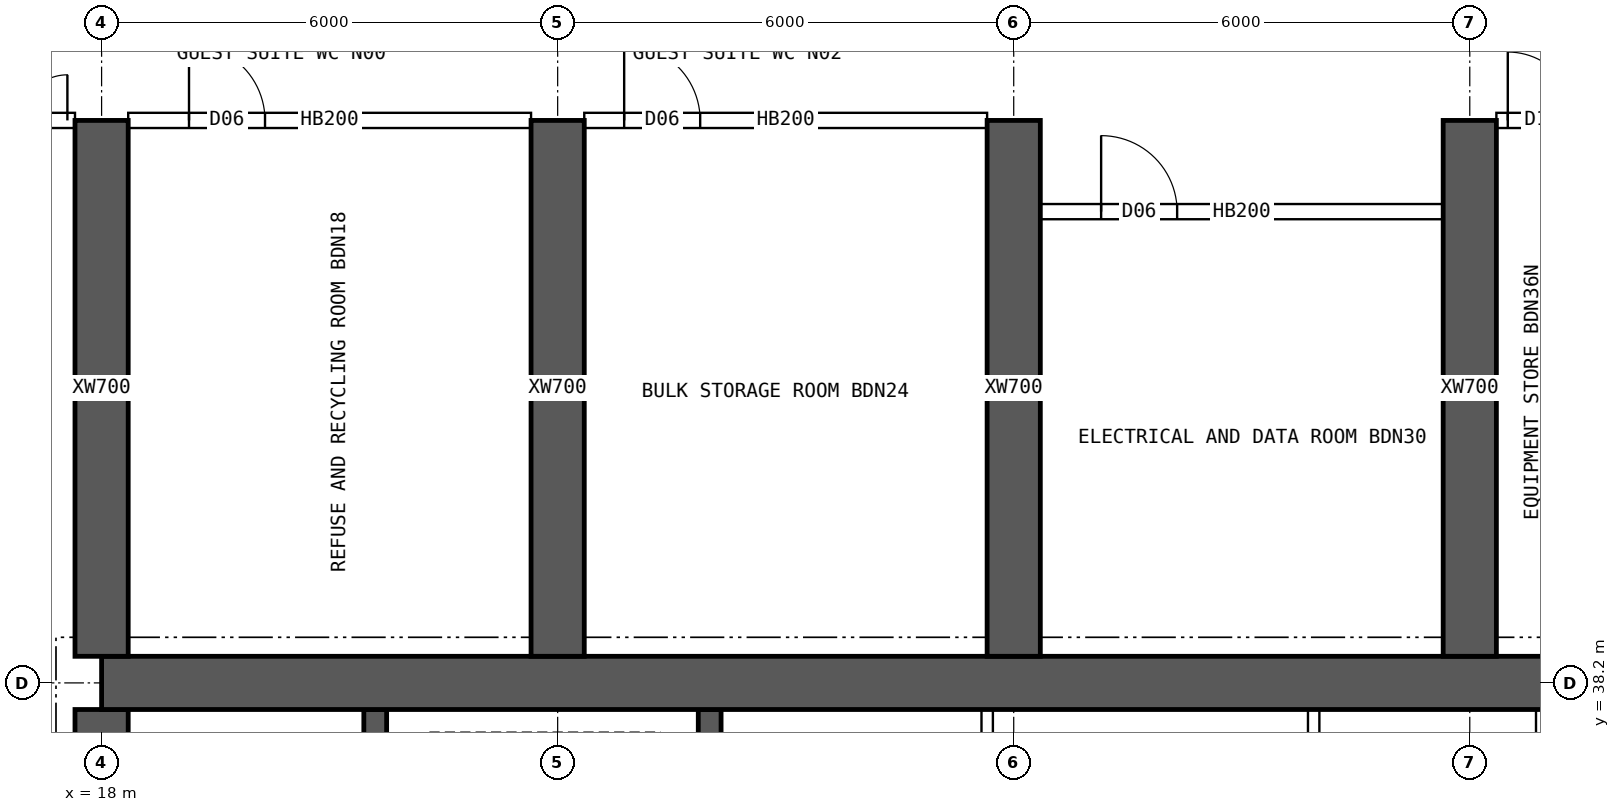
"""IFC4 building model, lengths in metres.
Left out: names, types, materials, properties, quantities, classifications, styles, units other than length and angle.
Written with IfcOpenShell. Run it as: python <this file> out.ifc"""

import sys

from ifc_helpers import new_model, si_unit, direction, frame, frame_2d, origin, place, context, subcontext, project, spatial, rectangle, extrude, element, fill, save


model = new_model("IFC4")
c1 = context("Model", 3, precision=1e-05, world=origin(), true_north=direction((0.0, 1.0)))
c2 = subcontext(c1, "Body", "Model", "MODEL_VIEW")
j1 = project(units=[si_unit("LENGTHUNIT", "METRE"), si_unit("PLANEANGLEUNIT", "RADIAN")], contexts=[c1])
p1 = place(None, origin())
s1 = spatial("IfcSite", under=j1, at=p1, CompositionType="ELEMENT")
p2 = place(p1, origin())
s2 = spatial("IfcBuilding", under=s1, at=p2, CompositionType="ELEMENT")
p3 = place(p2, frame((0.0, 0.0, 235.3)))
s3 = spatial("IfcBuildingStorey", under=s2, at=p3, CompositionType="ELEMENT", Elevation=235.3)
p4 = place(p3, frame((18.0, 38.2, 0.0), z_axis=(0.0, 0.0, 1.0), x_axis=(1.0, 0.0, 0.0)))
e1 = element("IfcWall", 1, at=p4, inside=s3, PredefinedType="SHEAR", context=c2, shape_type="SweptSolid", body=[
    extrude(rectangle(XDim=48.0, YDim=0.7, at=frame_2d((24.0, 0.0))), origin(), (0.0, 0.0, 1.0), 3.75),
])
p5 = place(p3, frame((18.0, 26.15, 0.0), z_axis=(0.0, 0.0, 1.0), x_axis=(0.0, 1.0, 0.0)))
e2 = element("IfcWall", 2, at=p5, inside=s3, PredefinedType="SHEAR", context=c2, shape_type="SweptSolid", body=[
    extrude(rectangle(XDim=11.7, YDim=0.7, at=frame_2d((5.85, 0.0))), origin(), (0.0, 0.0, 1.0), 3.75),
])
p6 = place(p5, frame((5.15, 0.0, 0.0)))
e3 = element("IfcOpeningElement", 3, at=p6, cuts=e2, PredefinedType="OPENING", context=c2, shape_type="SweptSolid", body=[
    extrude(rectangle(XDim=1.2, YDim=2.1, at=frame_2d((0.6, 1.05))), frame((0.0, 0.36, 0.0), z_axis=(0.0, -1.0, 0.0), x_axis=(1.0, 0.0, 0.0)), (0.0, 0.0, 1.0), 0.72),
])
for number, where, z_axis, x_axis in (
    (4, (21.6, 34.75, 0.0), (0.0, 0.0, 1.0), (0.0, 1.0, 0.0)),
    (5, (26.0, 34.75, 0.0), (0.0, 0.0, 1.0), (0.0, 1.0, 0.0)),
):
    element("IfcWall", number, at=place(p3, frame(where, z_axis=z_axis, x_axis=x_axis)), inside=s3, PredefinedType="SHEAR", context=c2, shape_type="SweptSolid", body=[
        extrude(rectangle(XDim=3.1, YDim=0.3, at=frame_2d((1.55, 0.0))), origin(), (0.0, 0.0, 1.0), 3.75),
    ])
for number, where, z_axis, x_axis in (
    (6, (18.0, 38.55, 0.0), (0.0, 0.0, 1.0), (0.0, 1.0, 0.0)),
    (7, (24.0, 38.55, 0.0), (0.0, 0.0, 1.0), (0.0, 1.0, 0.0)),
    (8, (30.0, 38.55, 0.0), (0.0, 0.0, 1.0), (0.0, 1.0, 0.0)),
    (9, (36.0, 38.55, 0.0), (0.0, 0.0, 1.0), (0.0, 1.0, 0.0)),
):
    element("IfcWall", number, at=place(p3, frame(where, z_axis=z_axis, x_axis=x_axis)), inside=s3, PredefinedType="SHEAR", context=c2, shape_type="SweptSolid", body=[
        extrude(rectangle(XDim=7.05, YDim=0.7, at=frame_2d((3.525, 0.0))), origin(), (0.0, 0.0, 1.0), 3.75),
    ])
for number, where, z_axis, x_axis in (
    (10, (29.651, 34.75, 0.0), (0.0, 0.0, 1.0), (0.0, 1.0, 0.0)),
    (11, (33.946, 34.75, 0.0), (0.0, 0.0, 1.0), (0.0, 1.0, 0.0)),
    (12, (36.946, 34.75, 0.0), (0.0, 0.0, 1.0), (0.0, 1.0, 0.0)),
):
    element("IfcWall", number, at=place(p3, frame(where, z_axis=z_axis, x_axis=x_axis)), inside=s3, PredefinedType="SOLIDWALL", context=c2, shape_type="SweptSolid", body=[
        extrude(rectangle(XDim=3.1, YDim=0.15, at=frame_2d((1.55, 0.0))), origin(), (0.0, 0.0, 1.0), 3.5),
    ])
p7 = place(p3, frame((15.6, 45.6, 0.0), z_axis=(0.0, 0.0, 1.0), x_axis=(1.0, 0.0, 0.0)))
e13 = element("IfcWall", 13, at=p7, inside=s3, PredefinedType="SOLIDWALL", context=c2, shape_type="SweptSolid", body=[
    extrude(rectangle(XDim=2.05, YDim=0.2, at=frame_2d((1.025, 0.0))), origin(), (0.0, 0.0, 1.0), 3.5),
])
p8 = place(p7, frame((0.75, 0.0, 0.0)))
e14 = element("IfcOpeningElement", 14, at=p8, cuts=e13, PredefinedType="OPENING", context=c2, shape_type="SweptSolid", body=[
    extrude(rectangle(XDim=1.2, YDim=2.1, at=frame_2d((0.6, 1.05))), frame((0.0, 0.11, 0.0), z_axis=(0.0, -1.0, 0.0), x_axis=(1.0, 0.0, 0.0)), (0.0, 0.0, 1.0), 0.22),
])
p9 = place(p3, frame((18.35, 45.6, 0.0), z_axis=(0.0, 0.0, 1.0), x_axis=(1.0, 0.0, 0.0)))
e15 = element("IfcWall", 15, at=p9, inside=s3, PredefinedType="SOLIDWALL", context=c2, shape_type="SweptSolid", body=[
    extrude(rectangle(XDim=5.3, YDim=0.2, at=frame_2d((2.65, 0.0))), origin(), (0.0, 0.0, 1.0), 3.5),
])
p10 = place(p9, frame((0.8, 0.0, 0.0)))
e16 = element("IfcOpeningElement", 16, at=p10, cuts=e15, PredefinedType="OPENING", context=c2, shape_type="SweptSolid", body=[
    extrude(rectangle(XDim=1.0, YDim=2.1, at=frame_2d((0.5, 1.05))), frame((0.0, 0.11, 0.0), z_axis=(0.0, -1.0, 0.0), x_axis=(1.0, 0.0, 0.0)), (0.0, 0.0, 1.0), 0.22),
])
p11 = place(p3, frame((24.35, 45.6, 0.0), z_axis=(0.0, 0.0, 1.0), x_axis=(1.0, 0.0, 0.0)))
e17 = element("IfcWall", 17, at=p11, inside=s3, PredefinedType="SOLIDWALL", context=c2, shape_type="SweptSolid", body=[
    extrude(rectangle(XDim=5.3, YDim=0.2, at=frame_2d((2.65, 0.0))), origin(), (0.0, 0.0, 1.0), 3.5),
])
p12 = place(p11, frame((0.525, 0.0, 0.0)))
e18 = element("IfcOpeningElement", 18, at=p12, cuts=e17, PredefinedType="OPENING", context=c2, shape_type="SweptSolid", body=[
    extrude(rectangle(XDim=1.0, YDim=2.1, at=frame_2d((0.5, 1.05))), frame((0.0, 0.11, 0.0), z_axis=(0.0, -1.0, 0.0), x_axis=(1.0, 0.0, 0.0)), (0.0, 0.0, 1.0), 0.22),
])
p13 = place(p3, frame((36.35, 45.6, 0.0), z_axis=(0.0, 0.0, 1.0), x_axis=(1.0, 0.0, 0.0)))
e19 = element("IfcWall", 19, at=p13, inside=s3, PredefinedType="SOLIDWALL", context=c2, shape_type="SweptSolid", body=[
    extrude(rectangle(XDim=5.3, YDim=0.2, at=frame_2d((2.65, 0.0))), origin(), (0.0, 0.0, 1.0), 3.5),
])
p14 = place(p13, frame((0.15, 0.0, 0.0)))
e20 = element("IfcOpeningElement", 20, at=p14, cuts=e19, PredefinedType="OPENING", context=c2, shape_type="SweptSolid", body=[
    extrude(rectangle(XDim=0.9, YDim=2.1, at=frame_2d((0.45, 1.05))), frame((0.0, 0.11, 0.0), z_axis=(0.0, -1.0, 0.0), x_axis=(1.0, 0.0, 0.0)), (0.0, 0.0, 1.0), 0.22),
])
p15 = place(p13, frame((2.34, 0.0, 0.0)))
e21 = element("IfcOpeningElement", 21, at=p15, cuts=e19, PredefinedType="OPENING", context=c2, shape_type="SweptSolid", body=[
    extrude(rectangle(XDim=0.9, YDim=2.1, at=frame_2d((0.45, 1.05))), frame((0.0, 0.11, 0.0), z_axis=(0.0, -1.0, 0.0), x_axis=(1.0, 0.0, 0.0)), (0.0, 0.0, 1.0), 0.22),
])
p16 = place(p3, frame((30.35, 44.4, 0.0), z_axis=(0.0, 0.0, 1.0), x_axis=(1.0, 0.0, 0.0)))
e22 = element("IfcWall", 22, at=p16, inside=s3, PredefinedType="SOLIDWALL", context=c2, shape_type="SweptSolid", body=[
    extrude(rectangle(XDim=5.3, YDim=0.2, at=frame_2d((2.65, 0.0))), origin(), (0.0, 0.0, 1.0), 3.5),
])
p17 = place(p16, frame((0.8, 0.0, 0.0)))
e23 = element("IfcOpeningElement", 23, at=p17, cuts=e22, PredefinedType="OPENING", context=c2, shape_type="SweptSolid", body=[
    extrude(rectangle(XDim=1.0, YDim=2.1, at=frame_2d((0.5, 1.05))), frame((0.0, 0.11, 0.0), z_axis=(0.0, -1.0, 0.0), x_axis=(1.0, 0.0, 0.0)), (0.0, 0.0, 1.0), 0.22),
])
p18 = place(p8, origin())
e24 = element("IfcDoor", 24, at=p18, inside=s3, OperationType="DOUBLE_DOOR_SINGLE_SWING", PredefinedType="DOOR", context=c2, shape_type="SweptSolid", body=[
    extrude(rectangle(XDim=1.2, YDim=2.1, at=frame_2d((0.6, 1.05))), frame((0.0, 0.025, 0.0), z_axis=(0.0, -1.0, 0.0), x_axis=(1.0, 0.0, 0.0)), (0.0, 0.0, 1.0), 0.05),
])
fill(e14, e24)
p19 = place(p10, origin())
e25 = element("IfcDoor", 25, at=p19, inside=s3, OperationType="SINGLE_SWING_LEFT", PredefinedType="DOOR", context=c2, shape_type="SweptSolid", body=[
    extrude(rectangle(XDim=1.0, YDim=2.1, at=frame_2d((0.5, 1.05))), frame((0.0, 0.025, 0.0), z_axis=(0.0, -1.0, 0.0), x_axis=(1.0, 0.0, 0.0)), (0.0, 0.0, 1.0), 0.05),
])
fill(e16, e25)
p20 = place(p12, origin())
e26 = element("IfcDoor", 26, at=p20, inside=s3, OperationType="SINGLE_SWING_LEFT", PredefinedType="DOOR", context=c2, shape_type="SweptSolid", body=[
    extrude(rectangle(XDim=1.0, YDim=2.1, at=frame_2d((0.5, 1.05))), frame((0.0, 0.025, 0.0), z_axis=(0.0, -1.0, 0.0), x_axis=(1.0, 0.0, 0.0)), (0.0, 0.0, 1.0), 0.05),
])
fill(e18, e26)
p21 = place(p17, origin())
e27 = element("IfcDoor", 27, at=p21, inside=s3, OperationType="SINGLE_SWING_LEFT", PredefinedType="DOOR", context=c2, shape_type="SweptSolid", body=[
    extrude(rectangle(XDim=1.0, YDim=2.1, at=frame_2d((0.5, 1.05))), frame((0.0, 0.025, 0.0), z_axis=(0.0, -1.0, 0.0), x_axis=(1.0, 0.0, 0.0)), (0.0, 0.0, 1.0), 0.05),
])
fill(e23, e27)
p22 = place(p14, origin())
e28 = element("IfcDoor", 28, at=p22, inside=s3, OperationType="SINGLE_SWING_LEFT", PredefinedType="DOOR", context=c2, shape_type="SweptSolid", body=[
    extrude(rectangle(XDim=0.9, YDim=2.1, at=frame_2d((0.45, 1.05))), frame((0.0, 0.025, 0.0), z_axis=(0.0, -1.0, 0.0), x_axis=(1.0, 0.0, 0.0)), (0.0, 0.0, 1.0), 0.05),
])
fill(e20, e28)
save(model, sys.argv[1])
